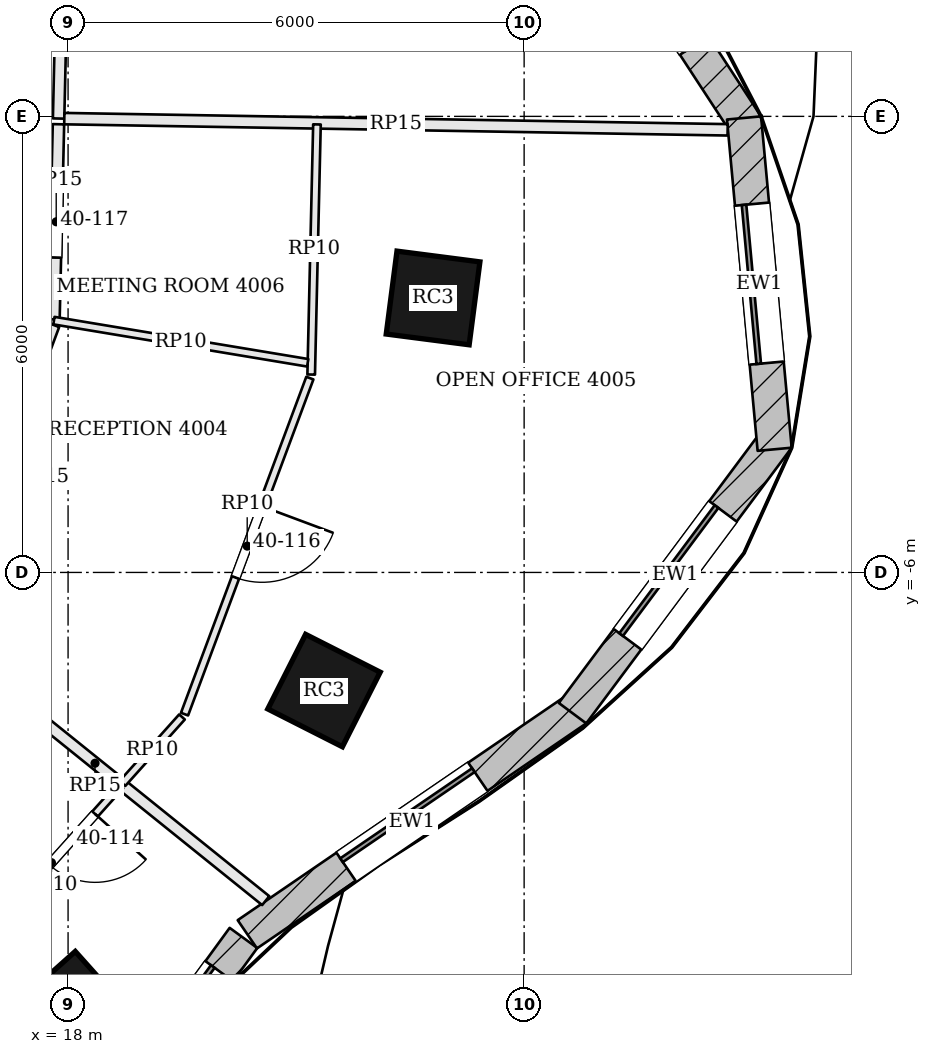
"""IFC4 building model, lengths in metres.
Left out: names, types, materials, properties, quantities, classifications, styles, units other than length and angle.
Written with IfcOpenShell. Run it as: python <this file> out.ifc"""

import sys

from ifc_helpers import new_model, si_unit, direction, frame, frame_2d, origin, origin_2d, place, context, subcontext, project, spatial, rectangle, extrude, element, fill, save


model = new_model("IFC4")
c1 = context("Model", 3, precision=1e-05, world=origin(), true_north=direction((0.0, 1.0)))
c2 = subcontext(c1, "Body", "Model", "MODEL_VIEW")
j1 = project(units=[si_unit("LENGTHUNIT", "METRE"), si_unit("PLANEANGLEUNIT", "RADIAN")], contexts=[c1])
p1 = place(None, origin())
s1 = spatial("IfcSite", under=j1, at=p1, CompositionType="ELEMENT")
p2 = place(p1, origin())
s2 = spatial("IfcBuilding", under=s1, at=p2, CompositionType="ELEMENT")
p3 = place(p2, frame((0.0, 0.0, 165.6)))
s3 = spatial("IfcBuildingStorey", under=s2, at=p3, CompositionType="ELEMENT", Elevation=165.6)
for number, where, z_axis, x_axis in (
    (1, (18.051, -11.763, 0.0), (0.0, 0.0, 1.0), (0.746, 0.666, 0.0)),
    (2, (21.367, -7.554, 0.0), (0.0, 0.0, 1.0), (0.452, 0.892, 0.0)),
    (3, (22.802, -2.389, 0.0), (0.0, 0.0, 1.0), (0.129, 0.992, 0.0)),
):
    element("IfcColumn", number, at=place(p3, frame(where, z_axis=z_axis, x_axis=x_axis)), inside=s3, PredefinedType="COLUMN", context=c2, shape_type="SweptSolid", body=[
        extrude(rectangle(XDim=1.1, YDim=1.1, at=origin_2d()), origin(), (0.0, 0.0, 1.0), 3.1),
    ])
p4 = place(p3, frame((26.926, -0.119, 0.0), z_axis=(0.0, 0.0, 1.0), x_axis=(-0.547072638725, 0.837085137819, 0.0)))
e4 = element("IfcWall", 4, at=p4, inside=s3, PredefinedType="SOLIDWALL", context=c2, shape_type="SweptSolid", body=[
    extrude(rectangle(XDim=4.616, YDim=0.45, at=frame_2d((2.308, 0.0))), origin(), (0.0, 0.0, 1.0), 3.6),
])
p5 = place(p4, frame((1.258, 0.0, 0.9)))
e5 = element("IfcOpeningElement", 5, at=p5, cuts=e4, PredefinedType="OPENING", context=c2, shape_type="SweptSolid", body=[
    extrude(rectangle(XDim=2.1, YDim=1.8, at=frame_2d((1.05, 0.9))), frame((0.0, 0.235, 0.0), z_axis=(0.0, -1.0, 0.0), x_axis=(1.0, 0.0, 0.0)), (0.0, 0.0, 1.0), 0.47),
])
p6 = place(p3, frame((18.434, -13.381, 0.0), z_axis=(0.0, 0.0, 1.0), x_axis=(0.58867331001, 0.808371037384, 0.0)))
e6 = element("IfcWall", 6, at=p6, inside=s3, PredefinedType="SOLIDWALL", context=c2, shape_type="SweptSolid", body=[
    extrude(rectangle(XDim=3.183, YDim=0.45, at=frame_2d((1.591, 0.0))), origin(), (0.0, 0.0, 1.0), 3.6),
])
p7 = place(p6, frame((0.541, 0.0, 0.9)))
e7 = element("IfcOpeningElement", 7, at=p7, cuts=e6, PredefinedType="OPENING", context=c2, shape_type="SweptSolid", body=[
    extrude(rectangle(XDim=2.1, YDim=1.8, at=frame_2d((1.05, 0.9))), frame((0.0, 0.235, 0.0), z_axis=(0.0, -1.0, 0.0), x_axis=(1.0, 0.0, 0.0)), (0.0, 0.0, 1.0), 0.47),
])
p8 = place(p3, frame((20.359, -10.76, 0.0), z_axis=(0.0, 0.0, 1.0), x_axis=(0.825616460661, 0.564231743068, 0.0)))
e8 = element("IfcWall", 8, at=p8, inside=s3, PredefinedType="SOLIDWALL", context=c2, shape_type="SweptSolid", body=[
    extrude(rectangle(XDim=5.246, YDim=0.45, at=frame_2d((2.623, 0.0))), origin(), (0.0, 0.0, 1.0), 3.6),
])
p9 = place(p8, frame((1.573, 0.0, 0.9)))
e9 = element("IfcOpeningElement", 9, at=p9, cuts=e8, PredefinedType="OPENING", context=c2, shape_type="SweptSolid", body=[
    extrude(rectangle(XDim=2.1, YDim=1.8, at=frame_2d((1.05, 0.9))), frame((0.0, 0.235, 0.0), z_axis=(0.0, -1.0, 0.0), x_axis=(1.0, 0.0, 0.0)), (0.0, 0.0, 1.0), 0.47),
])
p10 = place(p3, frame((24.637, -7.852, 0.0), z_axis=(0.0, 0.0, 1.0), x_axis=(0.597518748368, 0.80185494034, 0.0)))
e10 = element("IfcWall", 10, at=p10, inside=s3, PredefinedType="SOLIDWALL", context=c2, shape_type="SweptSolid", body=[
    extrude(rectangle(XDim=4.523, YDim=0.45, at=frame_2d((2.262, 0.0))), origin(), (0.0, 0.0, 1.0), 3.6),
])
p11 = place(p10, frame((1.212, 0.0, 0.9)))
e11 = element("IfcOpeningElement", 11, at=p11, cuts=e10, PredefinedType="OPENING", context=c2, shape_type="SweptSolid", body=[
    extrude(rectangle(XDim=2.1, YDim=1.8, at=frame_2d((1.05, 0.9))), frame((0.0, 0.235, 0.0), z_axis=(0.0, -1.0, 0.0), x_axis=(1.0, 0.0, 0.0)), (0.0, 0.0, 1.0), 0.47),
])
p12 = place(p3, frame((27.296, -4.38, 0.0), z_axis=(0.0, 0.0, 1.0), x_axis=(-0.092079421996, 0.995751665851, 0.0)))
e12 = element("IfcWall", 12, at=p12, inside=s3, PredefinedType="SOLIDWALL", context=c2, shape_type="SweptSolid", body=[
    extrude(rectangle(XDim=4.377, YDim=0.45, at=frame_2d((2.189, 0.0))), origin(), (0.0, 0.0, 1.0), 3.6),
])
p13 = place(p12, frame((1.139, 0.0, 0.9)))
e13 = element("IfcOpeningElement", 13, at=p13, cuts=e12, PredefinedType="OPENING", context=c2, shape_type="SweptSolid", body=[
    extrude(rectangle(XDim=2.1, YDim=1.8, at=frame_2d((1.05, 0.9))), frame((0.0, 0.235, 0.0), z_axis=(0.0, -1.0, 0.0), x_axis=(1.0, 0.0, 0.0)), (0.0, 0.0, 1.0), 0.47),
])
p14 = place(p3, frame((17.875, -0.028, 0.0), z_axis=(0.0, 0.0, 1.0), x_axis=(0.023087091456, 0.999733457582, 0.0)))
e14 = element("IfcWall", 14, at=p14, inside=s3, PredefinedType="PARTITIONING", context=c2, shape_type="SweptSolid", body=[
    extrude(rectangle(XDim=1.956, YDim=0.15, at=frame_2d((0.978, 0.0))), origin(), (0.0, 0.0, 1.0), 3.098),
])
p15 = place(p3, frame((26.677, -0.177, 0.0), z_axis=(0.0, 0.0, 1.0), x_axis=(-0.999857756393, 0.016866148966, 0.0)))
e15 = element("IfcWall", 15, at=p15, inside=s3, PredefinedType="PARTITIONING", context=c2, shape_type="SweptSolid", body=[
    extrude(rectangle(XDim=8.729, YDim=0.15, at=frame_2d((4.364, 0.0))), origin(), (0.0, 0.0, 1.0), 3.19),
])
p16 = place(p3, frame((20.6, -10.318, 0.0), z_axis=(0.0, 0.0, 1.0), x_axis=(-0.778973348429, 0.627057032842, 0.0)))
e16 = element("IfcWall", 16, at=p16, inside=s3, PredefinedType="PARTITIONING", context=c2, shape_type="SweptSolid", body=[
    extrude(rectangle(XDim=5.766, YDim=0.15, at=frame_2d((2.883, 0.0))), origin(), (0.0, 0.0, 1.0), 3.19),
])
p17 = place(p3, frame((16.597, -6.003, 0.0), z_axis=(0.0, 0.0, 1.0), x_axis=(0.349499455299, 0.936936567088, 0.0)))
e17 = element("IfcWall", 17, at=p17, inside=s3, PredefinedType="PARTITIONING", context=c2, shape_type="SweptSolid", body=[
    extrude(rectangle(XDim=3.477, YDim=0.15, at=frame_2d((1.739, 0.0))), origin(), (0.0, 0.0, 1.0), 3.098),
])
p18 = place(p17, frame((0.44, 0.0, 0.0)))
e18 = element("IfcOpeningElement", 18, at=p18, cuts=e17, PredefinedType="OPENING", context=c2, shape_type="SweptSolid", body=[
    extrude(rectangle(XDim=1.8, YDim=2.1, at=frame_2d((0.9, 1.05))), frame((0.0, 0.085, 0.0), z_axis=(0.0, -1.0, 0.0), x_axis=(1.0, 0.0, 0.0)), (0.0, 0.0, 1.0), 0.17),
])
p19 = place(p3, frame((17.814, -2.67, 0.0), z_axis=(0.0, 0.0, 1.0), x_axis=(0.023010835286, 0.999735215674, 0.0)))
e19 = element("IfcWall", 19, at=p19, inside=s3, PredefinedType="PARTITIONING", context=c2, shape_type="SweptSolid", body=[
    extrude(rectangle(XDim=2.568, YDim=0.15, at=frame_2d((1.284, 0.0))), origin(), (0.0, 0.0, 1.0), 3.098),
])
p20 = place(p19, frame((0.813, 0.0, 0.0)))
e20 = element("IfcOpeningElement", 20, at=p20, cuts=e19, PredefinedType="OPENING", context=c2, shape_type="SweptSolid", body=[
    extrude(rectangle(XDim=1.0, YDim=2.4, at=frame_2d((0.5, 1.2))), frame((0.0, 0.085, 0.0), z_axis=(0.0, -1.0, 0.0), x_axis=(1.0, 0.0, 0.0)), (0.0, 0.0, 1.0), 0.17),
])
p21 = place(p3, frame((18.689, -8.805, 0.0), z_axis=(0.0, 0.0, 1.0), x_axis=(-0.667327137391, -0.74476472238, 0.0)))
e21 = element("IfcWall", 21, at=p21, inside=s3, PredefinedType="PARTITIONING", context=c2, shape_type="SweptSolid", body=[
    extrude(rectangle(XDim=2.721, YDim=0.1, at=frame_2d((1.36, 0.0))), origin(), (0.0, 0.0, 1.0), 3.084),
])
p22 = place(p21, frame((0.5, 0.0, 0.0)))
e22 = element("IfcOpeningElement", 22, at=p22, cuts=e21, PredefinedType="OPENING", context=c2, shape_type="SweptSolid", body=[
    extrude(rectangle(XDim=0.9, YDim=2.1, at=frame_2d((0.45, 1.05))), frame((0.0, 0.06, 0.0), z_axis=(0.0, -1.0, 0.0), x_axis=(1.0, 0.0, 0.0)), (0.0, 0.0, 1.0), 0.12),
])
p23 = place(p3, frame((21.274, -0.106, 0.0), z_axis=(0.0, 0.0, 1.0), x_axis=(-0.023066789158, -0.999733926221, 0.0)))
e23 = element("IfcWall", 23, at=p23, inside=s3, PredefinedType="PARTITIONING", context=c2, shape_type="SweptSolid", body=[
    extrude(rectangle(XDim=3.292, YDim=0.1, at=frame_2d((1.646, 0.0))), origin(), (0.0, 0.0, 1.0), 3.084),
])
p24 = place(p3, frame((21.181, -3.443, 0.0), z_axis=(0.0, 0.0, 1.0), x_axis=(-0.349438657616, -0.936959243811, 0.0)))
e24 = element("IfcWall", 24, at=p24, inside=s3, PredefinedType="PARTITIONING", context=c2, shape_type="SweptSolid", body=[
    extrude(rectangle(XDim=4.718, YDim=0.1, at=frame_2d((2.359, 0.0))), origin(), (0.0, 0.0, 1.0), 3.084),
])
p25 = place(p24, frame((1.8, 0.0, 0.0)))
e25 = element("IfcOpeningElement", 25, at=p25, cuts=e24, PredefinedType="OPENING", context=c2, shape_type="SweptSolid", body=[
    extrude(rectangle(XDim=1.0, YDim=2.1, at=frame_2d((0.5, 1.05))), frame((0.0, 0.06, 0.0), z_axis=(0.0, -1.0, 0.0), x_axis=(1.0, 0.0, 0.0)), (0.0, 0.0, 1.0), 0.12),
])
p26 = place(p3, frame((19.499, -7.901, 0.0), z_axis=(0.0, 0.0, 1.0), x_axis=(-0.667342114275, -0.74475130246, 0.0)))
e26 = element("IfcWall", 26, at=p26, inside=s3, PredefinedType="PARTITIONING", context=c2, shape_type="SweptSolid", body=[
    extrude(rectangle(XDim=1.173, YDim=0.1, at=frame_2d((0.587, 0.0))), origin(), (0.0, 0.0, 1.0), 3.084),
])
p27 = place(p3, frame((17.814, -2.687, 0.0), z_axis=(0.0, 0.0, 1.0), x_axis=(0.986465965325, -0.163966152774, 0.0)))
e27 = element("IfcWall", 27, at=p27, inside=s3, PredefinedType="PARTITIONING", context=c2, shape_type="SweptSolid", body=[
    extrude(rectangle(XDim=3.385, YDim=0.1, at=frame_2d((1.692, 0.0))), origin(), (0.0, 0.0, 1.0), 3.084),
])
p28 = place(p7, origin())
e28 = element("IfcWindow", 28, at=p28, inside=s3, PartitioningType="SINGLE_PANEL", PredefinedType="WINDOW", context=c2, shape_type="SweptSolid", body=[
    extrude(rectangle(XDim=2.1, YDim=1.8, at=frame_2d((1.05, 0.9))), frame((0.0, 0.135, 0.0), z_axis=(0.0, -1.0, 0.0), x_axis=(1.0, 0.0, 0.0)), (0.0, 0.0, 1.0), 0.06),
])
fill(e7, e28)
p29 = place(p9, origin())
e29 = element("IfcWindow", 29, at=p29, inside=s3, PartitioningType="SINGLE_PANEL", PredefinedType="WINDOW", context=c2, shape_type="SweptSolid", body=[
    extrude(rectangle(XDim=2.1, YDim=1.8, at=frame_2d((1.05, 0.9))), frame((0.0, 0.135, 0.0), z_axis=(0.0, -1.0, 0.0), x_axis=(1.0, 0.0, 0.0)), (0.0, 0.0, 1.0), 0.06),
])
fill(e9, e29)
p30 = place(p11, origin())
e30 = element("IfcWindow", 30, at=p30, inside=s3, PartitioningType="SINGLE_PANEL", PredefinedType="WINDOW", context=c2, shape_type="SweptSolid", body=[
    extrude(rectangle(XDim=2.1, YDim=1.8, at=frame_2d((1.05, 0.9))), frame((0.0, 0.135, 0.0), z_axis=(0.0, -1.0, 0.0), x_axis=(1.0, 0.0, 0.0)), (0.0, 0.0, 1.0), 0.06),
])
fill(e11, e30)
p31 = place(p13, origin())
e31 = element("IfcWindow", 31, at=p31, inside=s3, PartitioningType="SINGLE_PANEL", PredefinedType="WINDOW", context=c2, shape_type="SweptSolid", body=[
    extrude(rectangle(XDim=2.1, YDim=1.8, at=frame_2d((1.05, 0.9))), frame((0.0, 0.135, 0.0), z_axis=(0.0, -1.0, 0.0), x_axis=(1.0, 0.0, 0.0)), (0.0, 0.0, 1.0), 0.06),
])
fill(e13, e31)
p32 = place(p22, origin())
e32 = element("IfcDoor", 32, at=p32, inside=s3, OperationType="SINGLE_SWING_LEFT", PredefinedType="DOOR", context=c2, shape_type="SweptSolid", body=[
    extrude(rectangle(XDim=0.9, YDim=2.1, at=frame_2d((0.45, 1.05))), frame((0.0, 0.025, 0.0), z_axis=(0.0, -1.0, 0.0), x_axis=(1.0, 0.0, 0.0)), (0.0, 0.0, 1.0), 0.05),
])
fill(e22, e32)
p33 = place(p25, origin())
e33 = element("IfcDoor", 33, at=p33, inside=s3, OperationType="SINGLE_SWING_LEFT", PredefinedType="DOOR", context=c2, shape_type="SweptSolid", body=[
    extrude(rectangle(XDim=1.0, YDim=2.1, at=frame_2d((0.5, 1.05))), frame((0.0, 0.025, 0.0), z_axis=(0.0, -1.0, 0.0), x_axis=(1.0, 0.0, 0.0)), (0.0, 0.0, 1.0), 0.05),
])
fill(e25, e33)
p34 = place(p20, origin())
e34 = element("IfcDoor", 34, at=p34, inside=s3, OperationType="SINGLE_SWING_RIGHT", PredefinedType="DOOR", context=c2, shape_type="SweptSolid", body=[
    extrude(rectangle(XDim=1.0, YDim=2.4, at=frame_2d((0.5, 1.2))), frame((0.0, 0.025, 0.0), z_axis=(0.0, -1.0, 0.0), x_axis=(1.0, 0.0, 0.0)), (0.0, 0.0, 1.0), 0.05),
])
fill(e20, e34)
save(model, sys.argv[1])
